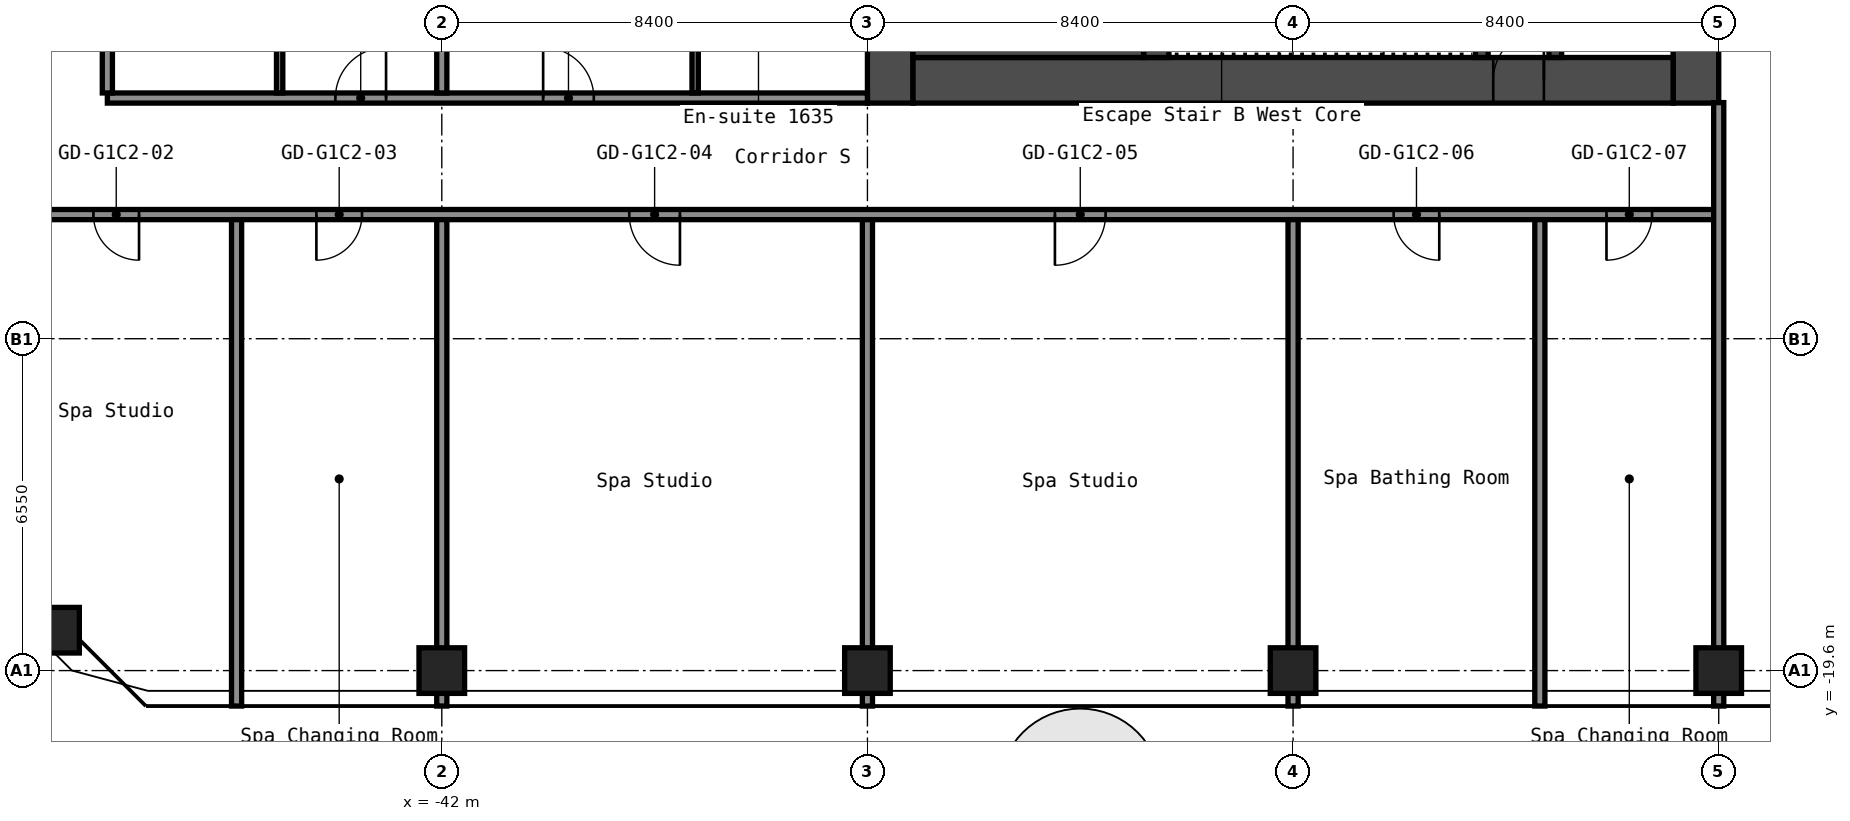
"""IFC4 building model, lengths in metres.
Left out: names, types, materials, properties, quantities, classifications, styles, units other than length and angle.
Written with IfcOpenShell. Run it as: python <this file> out.ifc"""

import sys

from ifc_helpers import new_model, si_unit, direction, frame, frame_2d, origin, origin_2d, place, context, subcontext, project, spatial, rectangle, hollow_rectangle, extrude, element, fill, save


model = new_model("IFC4")
c1 = context("Model", 3, precision=1e-05, world=origin(), true_north=direction((0.0, 1.0)))
c2 = subcontext(c1, "Body", "Model", "MODEL_VIEW")
j1 = project(units=[si_unit("LENGTHUNIT", "METRE"), si_unit("PLANEANGLEUNIT", "RADIAN")], contexts=[c1])
p1 = place(None, origin())
s1 = spatial("IfcSite", under=j1, at=p1, CompositionType="ELEMENT")
p2 = place(p1, origin())
s2 = spatial("IfcBuilding", under=s1, at=p2, CompositionType="ELEMENT")
p3 = place(p2, frame((0.0, 0.0, 58.2)))
s3 = spatial("IfcBuildingStorey", under=s2, at=p3, CompositionType="ELEMENT", Elevation=58.2)
for number, where, z_axis, x_axis in (
    (1, (-49.603, -18.803, 0.0), (0.0, 0.0, 1.0), (1.0, 0.0, 0.0)),
    (2, (-42.0, -19.6, 0.0), (0.0, 0.0, 1.0), (1.0, 0.0, 0.0)),
    (3, (-33.6, -19.6, 0.0), (0.0, 0.0, 1.0), (1.0, 0.0, 0.0)),
    (4, (-25.2, -19.6, 0.0), (0.0, 0.0, 1.0), (1.0, 0.0, 0.0)),
    (5, (-16.8, -19.6, 0.0), (0.0, 0.0, 1.0), (1.0, 0.0, 0.0)),
):
    element("IfcColumn", number, at=place(p3, frame(where, z_axis=z_axis, x_axis=x_axis)), inside=s3, PredefinedType="COLUMN", context=c2, shape_type="SweptSolid", body=[
        extrude(hollow_rectangle(XDim=0.9, YDim=0.9, WallThickness=0.036, at=origin_2d()), origin(), (0.0, 0.0, 1.0), 2.8),
    ])
p4 = place(p3, frame((-17.25, -8.4, 0.0), z_axis=(0.0, 0.0, 1.0), x_axis=(0.0, 1.0, 0.0)))
e6 = element("IfcWall", 6, at=p4, inside=s3, PredefinedType="SHEAR", context=c2, shape_type="SweptSolid", body=[
    extrude(rectangle(XDim=16.8, YDim=0.9, at=frame_2d((8.4, 0.0))), origin(), (0.0, 0.0, 1.0), 2.8),
])
p5 = place(p4, frame((12.75, 0.0, 0.0)))
e7 = element("IfcOpeningElement", 7, at=p5, cuts=e6, PredefinedType="OPENING", context=c2, shape_type="SweptSolid", body=[
    extrude(rectangle(XDim=1.2, YDim=2.1, at=frame_2d((0.6, 1.05))), frame((0.0, 0.46, 0.0), z_axis=(0.0, -1.0, 0.0), x_axis=(1.0, 0.0, 0.0)), (0.0, 0.0, 1.0), 0.92),
])
p6 = place(p4, frame((2.85, 0.0, 0.0)))
e8 = element("IfcOpeningElement", 8, at=p6, cuts=e6, PredefinedType="OPENING", context=c2, shape_type="SweptSolid", body=[
    extrude(rectangle(XDim=1.2, YDim=2.1, at=frame_2d((0.6, 1.05))), frame((0.0, 0.46, 0.0), z_axis=(0.0, -1.0, 0.0), x_axis=(1.0, 0.0, 0.0)), (0.0, 0.0, 1.0), 0.92),
])
p7 = place(p3, frame((-33.15, -8.4, 0.0), z_axis=(0.0, 0.0, 1.0), x_axis=(0.0, 1.0, 0.0)))
e9 = element("IfcWall", 9, at=p7, inside=s3, PredefinedType="SHEAR", context=c2, shape_type="SweptSolid", body=[
    extrude(rectangle(XDim=16.8, YDim=0.9, at=frame_2d((8.4, 0.0))), origin(), (0.0, 0.0, 1.0), 2.8),
])
p8 = place(p3, frame((-32.7, -7.95, 0.0), z_axis=(0.0, 0.0, 1.0), x_axis=(1.0, 0.0, 0.0)))
e10 = element("IfcWall", 10, at=p8, inside=s3, PredefinedType="SHEAR", context=c2, shape_type="SweptSolid", body=[
    extrude(rectangle(XDim=15.0, YDim=0.9, at=frame_2d((7.5, 0.0))), origin(), (0.0, 0.0, 1.0), 2.8),
])
p9 = place(p8, frame((11.45, 0.0, 0.0)))
e11 = element("IfcOpeningElement", 11, at=p9, cuts=e10, PredefinedType="OPENING", context=c2, shape_type="SweptSolid", body=[
    extrude(rectangle(XDim=1.0, YDim=2.1, at=frame_2d((0.5, 1.05))), frame((0.0, 0.46, 0.0), z_axis=(0.0, -1.0, 0.0), x_axis=(1.0, 0.0, 0.0)), (0.0, 0.0, 1.0), 0.92),
])
p10 = place(p3, frame((-20.025, -7.5, 0.0), z_axis=(0.0, 0.0, 1.0), x_axis=(0.0, 1.0, 0.0)))
e12 = element("IfcWall", 12, at=p10, inside=s3, PredefinedType="SHEAR", context=c2, shape_type="SweptSolid", body=[
    extrude(rectangle(XDim=6.3, YDim=0.25, at=frame_2d((3.15, 0.0))), origin(), (0.0, 0.0, 1.0), 2.8),
])
p11 = place(p10, frame((2.4, 0.0, 0.0)))
e13 = element("IfcOpeningElement", 13, at=p11, cuts=e12, PredefinedType="OPENING", context=c2, shape_type="SweptSolid", body=[
    extrude(rectangle(XDim=1.0, YDim=2.1, at=frame_2d((0.5, 1.05))), frame((0.0, 0.135, 0.0), z_axis=(0.0, -1.0, 0.0), x_axis=(1.0, 0.0, 0.0)), (0.0, 0.0, 1.0), 0.27),
])
p12 = place(p3, frame((-21.475, -7.5, 0.0), z_axis=(0.0, 0.0, 1.0), x_axis=(0.0, 1.0, 0.0)))
e14 = element("IfcWall", 14, at=p12, inside=s3, PredefinedType="SHEAR", context=c2, shape_type="SweptSolid", body=[
    extrude(rectangle(XDim=3.75, YDim=0.25, at=frame_2d((1.875, 0.0))), origin(), (0.0, 0.0, 1.0), 2.8),
])
p13 = place(p12, frame((1.3, 0.0, 0.0)))
e15 = element("IfcOpeningElement", 15, at=p13, cuts=e14, PredefinedType="OPENING", context=c2, shape_type="SweptSolid", body=[
    extrude(rectangle(XDim=1.2, YDim=2.1, at=frame_2d((0.6, 1.05))), frame((0.0, 0.135, 0.0), z_axis=(0.0, -1.0, 0.0), x_axis=(1.0, 0.0, 0.0)), (0.0, 0.0, 1.0), 0.27),
])
p14 = place(p3, frame((-27.9, -7.5, 0.0), z_axis=(0.0, 0.0, 1.0), x_axis=(0.0, 1.0, 0.0)))
e16 = element("IfcWall", 16, at=p14, inside=s3, PredefinedType="SHEAR", context=c2, shape_type="SweptSolid", body=[
    extrude(rectangle(XDim=3.75, YDim=0.5, at=frame_2d((1.875, 0.0))), origin(), (0.0, 0.0, 1.0), 2.8),
])
p15 = place(p3, frame((-32.7, -6.75, 0.0), z_axis=(0.0, 0.0, 1.0), x_axis=(1.0, 0.0, 0.0)))
e17 = element("IfcWall", 17, at=p15, inside=s3, PredefinedType="SHEAR", context=c2, shape_type="SweptSolid", body=[
    extrude(rectangle(XDim=4.55, YDim=1.5, at=frame_2d((2.275, 0.0))), origin(), (0.0, 0.0, 1.0), 2.8),
])
p16 = place(p3, frame((-51.1, -10.6, 0.0), z_axis=(0.0, 0.0, 1.0), x_axis=(1.0, 0.0, 0.0)))
e18 = element("IfcWall", 18, at=p16, inside=s3, PredefinedType="PARTITIONING", context=c2, shape_type="SweptSolid", body=[
    extrude(rectangle(XDim=34.3, YDim=0.2, at=frame_2d((17.15, 0.0))), origin(), (0.0, 0.0, 1.0), 2.8),
])
p17 = place(p16, frame((2.225, 0.0, 0.0)))
e19 = element("IfcOpeningElement", 19, at=p17, cuts=e18, PredefinedType="OPENING", context=c2, shape_type="SweptSolid", body=[
    extrude(rectangle(XDim=0.9, YDim=2.1, at=frame_2d((0.45, 1.05))), frame((0.0, 0.11, 0.0), z_axis=(0.0, -1.0, 0.0), x_axis=(1.0, 0.0, 0.0)), (0.0, 0.0, 1.0), 0.22),
])
p18 = place(p16, frame((6.625, 0.0, 0.0)))
e20 = element("IfcOpeningElement", 20, at=p18, cuts=e18, PredefinedType="OPENING", context=c2, shape_type="SweptSolid", body=[
    extrude(rectangle(XDim=0.9, YDim=2.1, at=frame_2d((0.45, 1.05))), frame((0.0, 0.11, 0.0), z_axis=(0.0, -1.0, 0.0), x_axis=(1.0, 0.0, 0.0)), (0.0, 0.0, 1.0), 0.22),
])
p19 = place(p16, frame((12.8, 0.0, 0.0)))
e21 = element("IfcOpeningElement", 21, at=p19, cuts=e18, PredefinedType="OPENING", context=c2, shape_type="SweptSolid", body=[
    extrude(rectangle(XDim=1.0, YDim=2.1, at=frame_2d((0.5, 1.05))), frame((0.0, 0.11, 0.0), z_axis=(0.0, -1.0, 0.0), x_axis=(1.0, 0.0, 0.0)), (0.0, 0.0, 1.0), 0.22),
])
p20 = place(p16, frame((21.2, 0.0, 0.0)))
e22 = element("IfcOpeningElement", 22, at=p20, cuts=e18, PredefinedType="OPENING", context=c2, shape_type="SweptSolid", body=[
    extrude(rectangle(XDim=1.0, YDim=2.1, at=frame_2d((0.5, 1.05))), frame((0.0, 0.11, 0.0), z_axis=(0.0, -1.0, 0.0), x_axis=(1.0, 0.0, 0.0)), (0.0, 0.0, 1.0), 0.22),
])
p21 = place(p16, frame((27.885, 0.0, 0.0)))
e23 = element("IfcOpeningElement", 23, at=p21, cuts=e18, PredefinedType="OPENING", context=c2, shape_type="SweptSolid", body=[
    extrude(rectangle(XDim=0.9, YDim=2.1, at=frame_2d((0.45, 1.05))), frame((0.0, 0.11, 0.0), z_axis=(0.0, -1.0, 0.0), x_axis=(1.0, 0.0, 0.0)), (0.0, 0.0, 1.0), 0.22),
])
p22 = place(p16, frame((32.085, 0.0, 0.0)))
e24 = element("IfcOpeningElement", 24, at=p22, cuts=e18, PredefinedType="OPENING", context=c2, shape_type="SweptSolid", body=[
    extrude(rectangle(XDim=0.9, YDim=2.1, at=frame_2d((0.45, 1.05))), frame((0.0, 0.11, 0.0), z_axis=(0.0, -1.0, 0.0), x_axis=(1.0, 0.0, 0.0)), (0.0, 0.0, 1.0), 0.22),
])
p23 = place(p3, frame((-48.6, -8.3, 0.0), z_axis=(0.0, 0.0, 1.0), x_axis=(1.0, 0.0, 0.0)))
e25 = element("IfcWall", 25, at=p23, inside=s3, PredefinedType="PARTITIONING", context=c2, shape_type="SweptSolid", body=[
    extrude(rectangle(XDim=15.0, YDim=0.2, at=frame_2d((7.5, 0.0))), origin(), (0.0, 0.0, 1.0), 2.8),
])
p24 = place(p23, frame((4.5, 0.0, 0.0)))
e26 = element("IfcOpeningElement", 26, at=p24, cuts=e25, PredefinedType="OPENING", context=c2, shape_type="SweptSolid", body=[
    extrude(rectangle(XDim=1.0, YDim=2.1, at=frame_2d((0.5, 1.05))), frame((0.0, 0.11, 0.0), z_axis=(0.0, -1.0, 0.0), x_axis=(1.0, 0.0, 0.0)), (0.0, 0.0, 1.0), 0.22),
])
p25 = place(p23, frame((8.6, 0.0, 0.0)))
e27 = element("IfcOpeningElement", 27, at=p25, cuts=e25, PredefinedType="OPENING", context=c2, shape_type="SweptSolid", body=[
    extrude(rectangle(XDim=1.0, YDim=2.1, at=frame_2d((0.5, 1.05))), frame((0.0, 0.11, 0.0), z_axis=(0.0, -1.0, 0.0), x_axis=(1.0, 0.0, 0.0)), (0.0, 0.0, 1.0), 0.22),
])
p26 = place(p3, frame((-48.6, -8.2, 0.0), z_axis=(0.0, 0.0, 1.0), x_axis=(0.0, 1.0, 0.0)))
e28 = element("IfcWall", 28, at=p26, inside=s3, PredefinedType="PARTITIONING", context=c2, shape_type="SweptSolid", body=[
    extrude(rectangle(XDim=16.4, YDim=0.2, at=frame_2d((8.2, 0.0))), origin(), (0.0, 0.0, 1.0), 2.8),
])
p27 = place(p3, frame((-46.05, -20.3, 0.0), z_axis=(0.0, 0.0, 1.0), x_axis=(0.0, 1.0, 0.0)))
e29 = element("IfcWall", 29, at=p27, inside=s3, PredefinedType="PARTITIONING", context=c2, shape_type="SweptSolid", body=[
    extrude(rectangle(XDim=9.6, YDim=0.2, at=frame_2d((4.8, 0.0))), origin(), (0.0, 0.0, 1.0), 2.8),
])
p28 = place(p3, frame((-45.2, -8.2, 0.0), z_axis=(0.0, 0.0, 1.0), x_axis=(0.0, 1.0, 0.0)))
e30 = element("IfcWall", 30, at=p28, inside=s3, PredefinedType="PARTITIONING", context=c2, shape_type="SweptSolid", body=[
    extrude(rectangle(XDim=3.3, YDim=0.125, at=frame_2d((1.65, 0.0))), origin(), (0.0, 0.0, 1.0), 2.8),
])
p29 = place(p3, frame((-42.0, -20.3, 0.0), z_axis=(0.0, 0.0, 1.0), x_axis=(0.0, 1.0, 0.0)))
e31 = element("IfcWall", 31, at=p29, inside=s3, PredefinedType="PARTITIONING", context=c2, shape_type="SweptSolid", body=[
    extrude(rectangle(XDim=9.6, YDim=0.2, at=frame_2d((4.8, 0.0))), origin(), (0.0, 0.0, 1.0), 2.8),
])
p30 = place(p3, frame((-42.0, -8.2, 0.0), z_axis=(0.0, 0.0, 1.0), x_axis=(0.0, 1.0, 0.0)))
e32 = element("IfcWall", 32, at=p30, inside=s3, PredefinedType="PARTITIONING", context=c2, shape_type="SweptSolid", body=[
    extrude(rectangle(XDim=8.2, YDim=0.2, at=frame_2d((4.1, 0.0))), origin(), (0.0, 0.0, 1.0), 2.8),
])
p31 = place(p3, frame((-37.0, -8.2, 0.0), z_axis=(0.0, 0.0, 1.0), x_axis=(0.0, 1.0, 0.0)))
e33 = element("IfcWall", 33, at=p31, inside=s3, PredefinedType="PARTITIONING", context=c2, shape_type="SweptSolid", body=[
    extrude(rectangle(XDim=3.3, YDim=0.125, at=frame_2d((1.65, 0.0))), origin(), (0.0, 0.0, 1.0), 2.8),
])
for number, where, z_axis, x_axis in (
    (34, (-33.6, -20.3, 0.0), (0.0, 0.0, 1.0), (0.0, 1.0, 0.0)),
    (35, (-25.2, -20.3, 0.0), (0.0, 0.0, 1.0), (0.0, 1.0, 0.0)),
    (36, (-20.33, -20.3, 0.0), (0.0, 0.0, 1.0), (0.0, 1.0, 0.0)),
):
    element("IfcWall", number, at=place(p3, frame(where, z_axis=z_axis, x_axis=x_axis)), inside=s3, PredefinedType="PARTITIONING", context=c2, shape_type="SweptSolid", body=[
        extrude(rectangle(XDim=9.6, YDim=0.2, at=frame_2d((4.8, 0.0))), origin(), (0.0, 0.0, 1.0), 2.8),
    ])
p32 = place(p3, frame((-16.8, -20.3, 0.0), z_axis=(0.0, 0.0, 1.0), x_axis=(0.0, 1.0, 0.0)))
e37 = element("IfcWall", 37, at=p32, inside=s3, PredefinedType="PARTITIONING", context=c2, shape_type="SweptSolid", body=[
    extrude(rectangle(XDim=11.91, YDim=0.2, at=frame_2d((5.955, 0.0))), origin(), (0.0, 0.0, 1.0), 2.8),
])
p33 = place(p9, origin())
e38 = element("IfcDoor", 38, at=p33, inside=s3, OperationType="SINGLE_SWING_LEFT", PredefinedType="DOOR", context=c2, shape_type="SweptSolid", body=[
    extrude(rectangle(XDim=1.0, YDim=2.1, at=frame_2d((0.5, 1.05))), frame((0.0, 0.025, 0.0), z_axis=(0.0, -1.0, 0.0), x_axis=(1.0, 0.0, 0.0)), (0.0, 0.0, 1.0), 0.05),
])
fill(e11, e38)
p34 = place(p17, origin())
e39 = element("IfcDoor", 39, at=p34, inside=s3, OperationType="SINGLE_SWING_RIGHT", PredefinedType="DOOR", context=c2, shape_type="SweptSolid", body=[
    extrude(rectangle(XDim=0.9, YDim=2.1, at=frame_2d((0.45, 1.05))), frame((0.0, 0.025, 0.0), z_axis=(0.0, -1.0, 0.0), x_axis=(1.0, 0.0, 0.0)), (0.0, 0.0, 1.0), 0.05),
])
fill(e19, e39)
p35 = place(p18, origin())
e40 = element("IfcDoor", 40, at=p35, inside=s3, OperationType="SINGLE_SWING_LEFT", PredefinedType="DOOR", context=c2, shape_type="SweptSolid", body=[
    extrude(rectangle(XDim=0.9, YDim=2.1, at=frame_2d((0.45, 1.05))), frame((0.0, 0.025, 0.0), z_axis=(0.0, -1.0, 0.0), x_axis=(1.0, 0.0, 0.0)), (0.0, 0.0, 1.0), 0.05),
])
fill(e20, e40)
p36 = place(p19, origin())
e41 = element("IfcDoor", 41, at=p36, inside=s3, OperationType="SINGLE_SWING_RIGHT", PredefinedType="DOOR", context=c2, shape_type="SweptSolid", body=[
    extrude(rectangle(XDim=1.0, YDim=2.1, at=frame_2d((0.5, 1.05))), frame((0.0, 0.025, 0.0), z_axis=(0.0, -1.0, 0.0), x_axis=(1.0, 0.0, 0.0)), (0.0, 0.0, 1.0), 0.05),
])
fill(e21, e41)
p37 = place(p20, origin())
e42 = element("IfcDoor", 42, at=p37, inside=s3, OperationType="SINGLE_SWING_LEFT", PredefinedType="DOOR", context=c2, shape_type="SweptSolid", body=[
    extrude(rectangle(XDim=1.0, YDim=2.1, at=frame_2d((0.5, 1.05))), frame((0.0, 0.025, 0.0), z_axis=(0.0, -1.0, 0.0), x_axis=(1.0, 0.0, 0.0)), (0.0, 0.0, 1.0), 0.05),
])
fill(e22, e42)
p38 = place(p21, origin())
e43 = element("IfcDoor", 43, at=p38, inside=s3, OperationType="SINGLE_SWING_RIGHT", PredefinedType="DOOR", context=c2, shape_type="SweptSolid", body=[
    extrude(rectangle(XDim=0.9, YDim=2.1, at=frame_2d((0.45, 1.05))), frame((0.0, 0.025, 0.0), z_axis=(0.0, -1.0, 0.0), x_axis=(1.0, 0.0, 0.0)), (0.0, 0.0, 1.0), 0.05),
])
fill(e23, e43)
p39 = place(p22, origin())
e44 = element("IfcDoor", 44, at=p39, inside=s3, OperationType="SINGLE_SWING_LEFT", PredefinedType="DOOR", context=c2, shape_type="SweptSolid", body=[
    extrude(rectangle(XDim=0.9, YDim=2.1, at=frame_2d((0.45, 1.05))), frame((0.0, 0.025, 0.0), z_axis=(0.0, -1.0, 0.0), x_axis=(1.0, 0.0, 0.0)), (0.0, 0.0, 1.0), 0.05),
])
fill(e24, e44)
p40 = place(p24, origin())
e45 = element("IfcDoor", 45, at=p40, inside=s3, OperationType="SINGLE_SWING_LEFT", PredefinedType="DOOR", context=c2, shape_type="SweptSolid", body=[
    extrude(rectangle(XDim=1.0, YDim=2.1, at=frame_2d((0.5, 1.05))), frame((0.0, 0.025, 0.0), z_axis=(0.0, -1.0, 0.0), x_axis=(1.0, 0.0, 0.0)), (0.0, 0.0, 1.0), 0.05),
])
fill(e26, e45)
p41 = place(p25, origin())
e46 = element("IfcDoor", 46, at=p41, inside=s3, OperationType="SINGLE_SWING_RIGHT", PredefinedType="DOOR", context=c2, shape_type="SweptSolid", body=[
    extrude(rectangle(XDim=1.0, YDim=2.1, at=frame_2d((0.5, 1.05))), frame((0.0, 0.025, 0.0), z_axis=(0.0, -1.0, 0.0), x_axis=(1.0, 0.0, 0.0)), (0.0, 0.0, 1.0), 0.05),
])
fill(e27, e46)
save(model, sys.argv[1])
